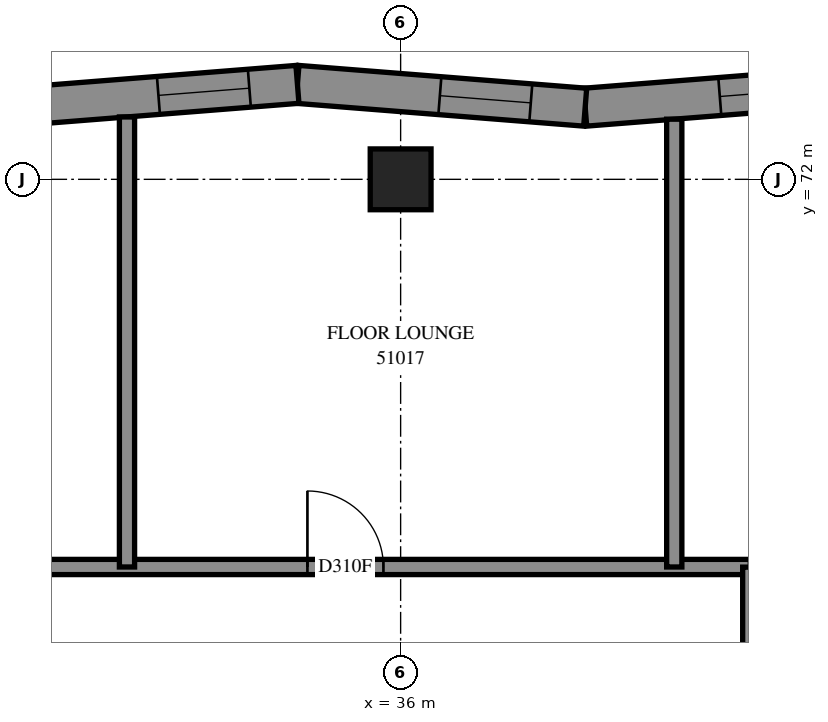
"""IFC4 building model, lengths in metres.
Left out: names, types, materials, properties, quantities, classifications, styles, units other than length and angle.
Written with IfcOpenShell. Run it as: python <this file> out.ifc"""

import sys

from ifc_helpers import new_model, si_unit, direction, frame, frame_2d, origin, origin_2d, place, context, subcontext, project, spatial, polyline, rectangle, outline, extrude, element, fill, save


model = new_model("IFC4")
c1 = context("Model", 3, precision=1e-05, world=origin(), true_north=direction((0.0, 1.0)))
c2 = subcontext(c1, "Body", "Model", "MODEL_VIEW")
j1 = project(units=[si_unit("LENGTHUNIT", "METRE"), si_unit("PLANEANGLEUNIT", "RADIAN")], contexts=[c1])
p1 = place(None, origin())
s1 = spatial("IfcSite", under=j1, at=p1, CompositionType="ELEMENT")
p2 = place(p1, origin())
s2 = spatial("IfcBuilding", under=s1, at=p2, CompositionType="ELEMENT")
p3 = place(p2, frame((0.0, 0.0, 189.6)))
s3 = spatial("IfcBuildingStorey", under=s2, at=p3, CompositionType="ELEMENT", Elevation=189.6)
p4 = place(p3, frame((36.0, 72.0, 0.0), z_axis=(0.0, 0.0, 1.0), x_axis=(1.0, 0.0, 0.0)))
e1 = element("IfcColumn", 1, at=p4, inside=s3, PredefinedType="COLUMN", context=c2, shape_type="SweptSolid", body=[
    extrude(rectangle(XDim=0.8, YDim=0.8, at=origin_2d()), origin(), (0.0, 0.0, 1.0), 3.1),
])
p5 = place(p3, frame((42.214, 73.249, 0.0), z_axis=(0.0, 0.0, 1.0), x_axis=(-0.9968746163, -0.078999996, 0.0)))
e2 = element("IfcWall", 2, at=p5, inside=s3, PredefinedType="SOLIDWALL", context=c2, shape_type="SweptSolid", body=[
    extrude(outline(polyline([(-0.02, -0.25), (3.778, -0.25), (3.817, 0.25), (0.02, 0.25), (-0.02, -0.25)])), origin(), (0.0, 0.0, 1.0), 3.1),
])
p6 = place(p5, frame((0.821, 0.0, 0.45)))
e3 = element("IfcOpeningElement", 3, at=p6, cuts=e2, PredefinedType="OPENING", context=c2, shape_type="SweptSolid", body=[
    extrude(rectangle(XDim=1.2, YDim=2.5, at=frame_2d((0.6, 1.25))), frame((0.0, 0.26, 0.0), z_axis=(0.0, -1.0, 0.0), x_axis=(1.0, 0.0, 0.0)), (0.0, 0.0, 1.0), 0.52),
])
p7 = place(p3, frame((38.428, 72.949, 0.0), z_axis=(0.0, 0.0, 1.0), x_axis=(-0.9968746163, 0.078999996, 0.0)))
e4 = element("IfcWall", 4, at=p7, inside=s3, PredefinedType="SOLIDWALL", context=c2, shape_type="SweptSolid", body=[
    extrude(outline(polyline([(0.02, -0.25), (3.817, -0.25), (3.778, 0.25), (-0.02, 0.25), (0.02, -0.25)])), origin(), (0.0, 0.0, 1.0), 3.1),
])
p8 = place(p7, frame((0.718, 0.0, 0.45)))
e5 = element("IfcOpeningElement", 5, at=p8, cuts=e4, PredefinedType="OPENING", context=c2, shape_type="SweptSolid", body=[
    extrude(rectangle(XDim=1.2, YDim=2.5, at=frame_2d((0.6, 1.25))), frame((0.0, 0.26, 0.0), z_axis=(0.0, -1.0, 0.0), x_axis=(1.0, 0.0, 0.0)), (0.0, 0.0, 1.0), 0.52),
])
p9 = place(p3, frame((34.642, 73.249, 0.0), z_axis=(0.0, 0.0, 1.0), x_axis=(-0.9968746163, -0.078999996, 0.0)))
e6 = element("IfcWall", 6, at=p9, inside=s3, PredefinedType="SOLIDWALL", context=c2, shape_type="SweptSolid", body=[
    extrude(outline(polyline([(-0.02, -0.25), (3.778, -0.25), (3.817, 0.25), (0.02, 0.25), (-0.02, -0.25)])), origin(), (0.0, 0.0, 1.0), 3.1),
])
p10 = place(p9, frame((0.635, 0.0, 0.45)))
e7 = element("IfcOpeningElement", 7, at=p10, cuts=e6, PredefinedType="OPENING", context=c2, shape_type="SweptSolid", body=[
    extrude(rectangle(XDim=1.2, YDim=2.5, at=frame_2d((0.6, 1.25))), frame((0.0, 0.26, 0.0), z_axis=(0.0, -1.0, 0.0), x_axis=(1.0, 0.0, 0.0)), (0.0, 0.0, 1.0), 0.52),
])
p11 = place(p3, frame((21.602, 66.9, 0.0), z_axis=(0.0, 0.0, 1.0), x_axis=(1.0, 0.0, 0.0)))
e8 = element("IfcWall", 8, at=p11, inside=s3, PredefinedType="PARTITIONING", context=c2, shape_type="SweptSolid", body=[
    extrude(rectangle(XDim=18.998, YDim=0.2, at=frame_2d((9.499, 0.0))), origin(), (0.0, 0.0, 1.0), 3.1),
])
p12 = place(p11, frame((5.972, 0.0, 0.0)))
e9 = element("IfcOpeningElement", 9, at=p12, cuts=e8, PredefinedType="OPENING", context=c2, shape_type="SweptSolid", body=[
    extrude(rectangle(XDim=1.0, YDim=2.1, at=frame_2d((0.5, 1.05))), frame((0.0, 0.11, 0.0), z_axis=(0.0, -1.0, 0.0), x_axis=(1.0, 0.0, 0.0)), (0.0, 0.0, 1.0), 0.22),
])
p13 = place(p11, frame((13.172, 0.0, 0.0)))
e10 = element("IfcOpeningElement", 10, at=p13, cuts=e8, PredefinedType="OPENING", context=c2, shape_type="SweptSolid", body=[
    extrude(rectangle(XDim=1.0, YDim=2.1, at=frame_2d((0.5, 1.05))), frame((0.0, 0.11, 0.0), z_axis=(0.0, -1.0, 0.0), x_axis=(1.0, 0.0, 0.0)), (0.0, 0.0, 1.0), 0.22),
])
p14 = place(p3, frame((32.4, 66.9, 0.0), z_axis=(0.0, 0.0, 1.0), x_axis=(0.0, 1.0, 0.0)))
e11 = element("IfcWall", 11, at=p14, inside=s3, PredefinedType="PARTITIONING", context=c2, shape_type="SweptSolid", body=[
    extrude(rectangle(XDim=5.921, YDim=0.2, at=frame_2d((2.96, 0.0))), origin(), (0.0, 0.0, 1.0), 3.1),
])
p15 = place(p3, frame((39.6, 66.9, 0.0), z_axis=(0.0, 0.0, 1.0), x_axis=(0.0, 1.0, 0.0)))
e12 = element("IfcWall", 12, at=p15, inside=s3, PredefinedType="PARTITIONING", context=c2, shape_type="SweptSolid", body=[
    extrude(rectangle(XDim=5.891, YDim=0.2, at=frame_2d((2.946, 0.0))), origin(), (0.0, 0.0, 1.0), 3.1),
])
p16 = place(p3, frame((40.6, 62.202, 0.0), z_axis=(0.0, 0.0, 1.0), x_axis=(0.0, 1.0, 0.0)))
e13 = element("IfcWall", 13, at=p16, inside=s3, PredefinedType="PARTITIONING", context=c2, shape_type="SweptSolid", body=[
    extrude(rectangle(XDim=4.696, YDim=0.2, at=frame_2d((2.348, 0.0))), origin(), (0.0, 0.0, 1.0), 3.1),
])
p17 = place(p6, origin())
e14 = element("IfcWindow", 14, at=p17, inside=s3, PartitioningType="SINGLE_PANEL", PredefinedType="WINDOW", context=c2, shape_type="SweptSolid", body=[
    extrude(rectangle(XDim=1.2, YDim=2.5, at=frame_2d((0.6, 1.25))), frame((0.0, 0.18, 0.0), z_axis=(0.0, -1.0, 0.0), x_axis=(1.0, 0.0, 0.0)), (0.0, 0.0, 1.0), 0.06),
])
fill(e3, e14)
p18 = place(p8, origin())
e15 = element("IfcWindow", 15, at=p18, inside=s3, PartitioningType="SINGLE_PANEL", PredefinedType="WINDOW", context=c2, shape_type="SweptSolid", body=[
    extrude(rectangle(XDim=1.2, YDim=2.5, at=frame_2d((0.6, 1.25))), frame((0.0, 0.18, 0.0), z_axis=(0.0, -1.0, 0.0), x_axis=(1.0, 0.0, 0.0)), (0.0, 0.0, 1.0), 0.06),
])
fill(e5, e15)
p19 = place(p10, origin())
e16 = element("IfcWindow", 16, at=p19, inside=s3, PartitioningType="SINGLE_PANEL", PredefinedType="WINDOW", context=c2, shape_type="SweptSolid", body=[
    extrude(rectangle(XDim=1.2, YDim=2.5, at=frame_2d((0.6, 1.25))), frame((0.0, 0.18, 0.0), z_axis=(0.0, -1.0, 0.0), x_axis=(1.0, 0.0, 0.0)), (0.0, 0.0, 1.0), 0.06),
])
fill(e7, e16)
p20 = place(p13, origin())
e17 = element("IfcDoor", 17, at=p20, inside=s3, OperationType="SINGLE_SWING_LEFT", PredefinedType="DOOR", context=c2, shape_type="SweptSolid", body=[
    extrude(rectangle(XDim=1.0, YDim=2.1, at=frame_2d((0.5, 1.05))), frame((0.0, 0.025, 0.0), z_axis=(0.0, -1.0, 0.0), x_axis=(1.0, 0.0, 0.0)), (0.0, 0.0, 1.0), 0.05),
])
fill(e10, e17)
save(model, sys.argv[1])
